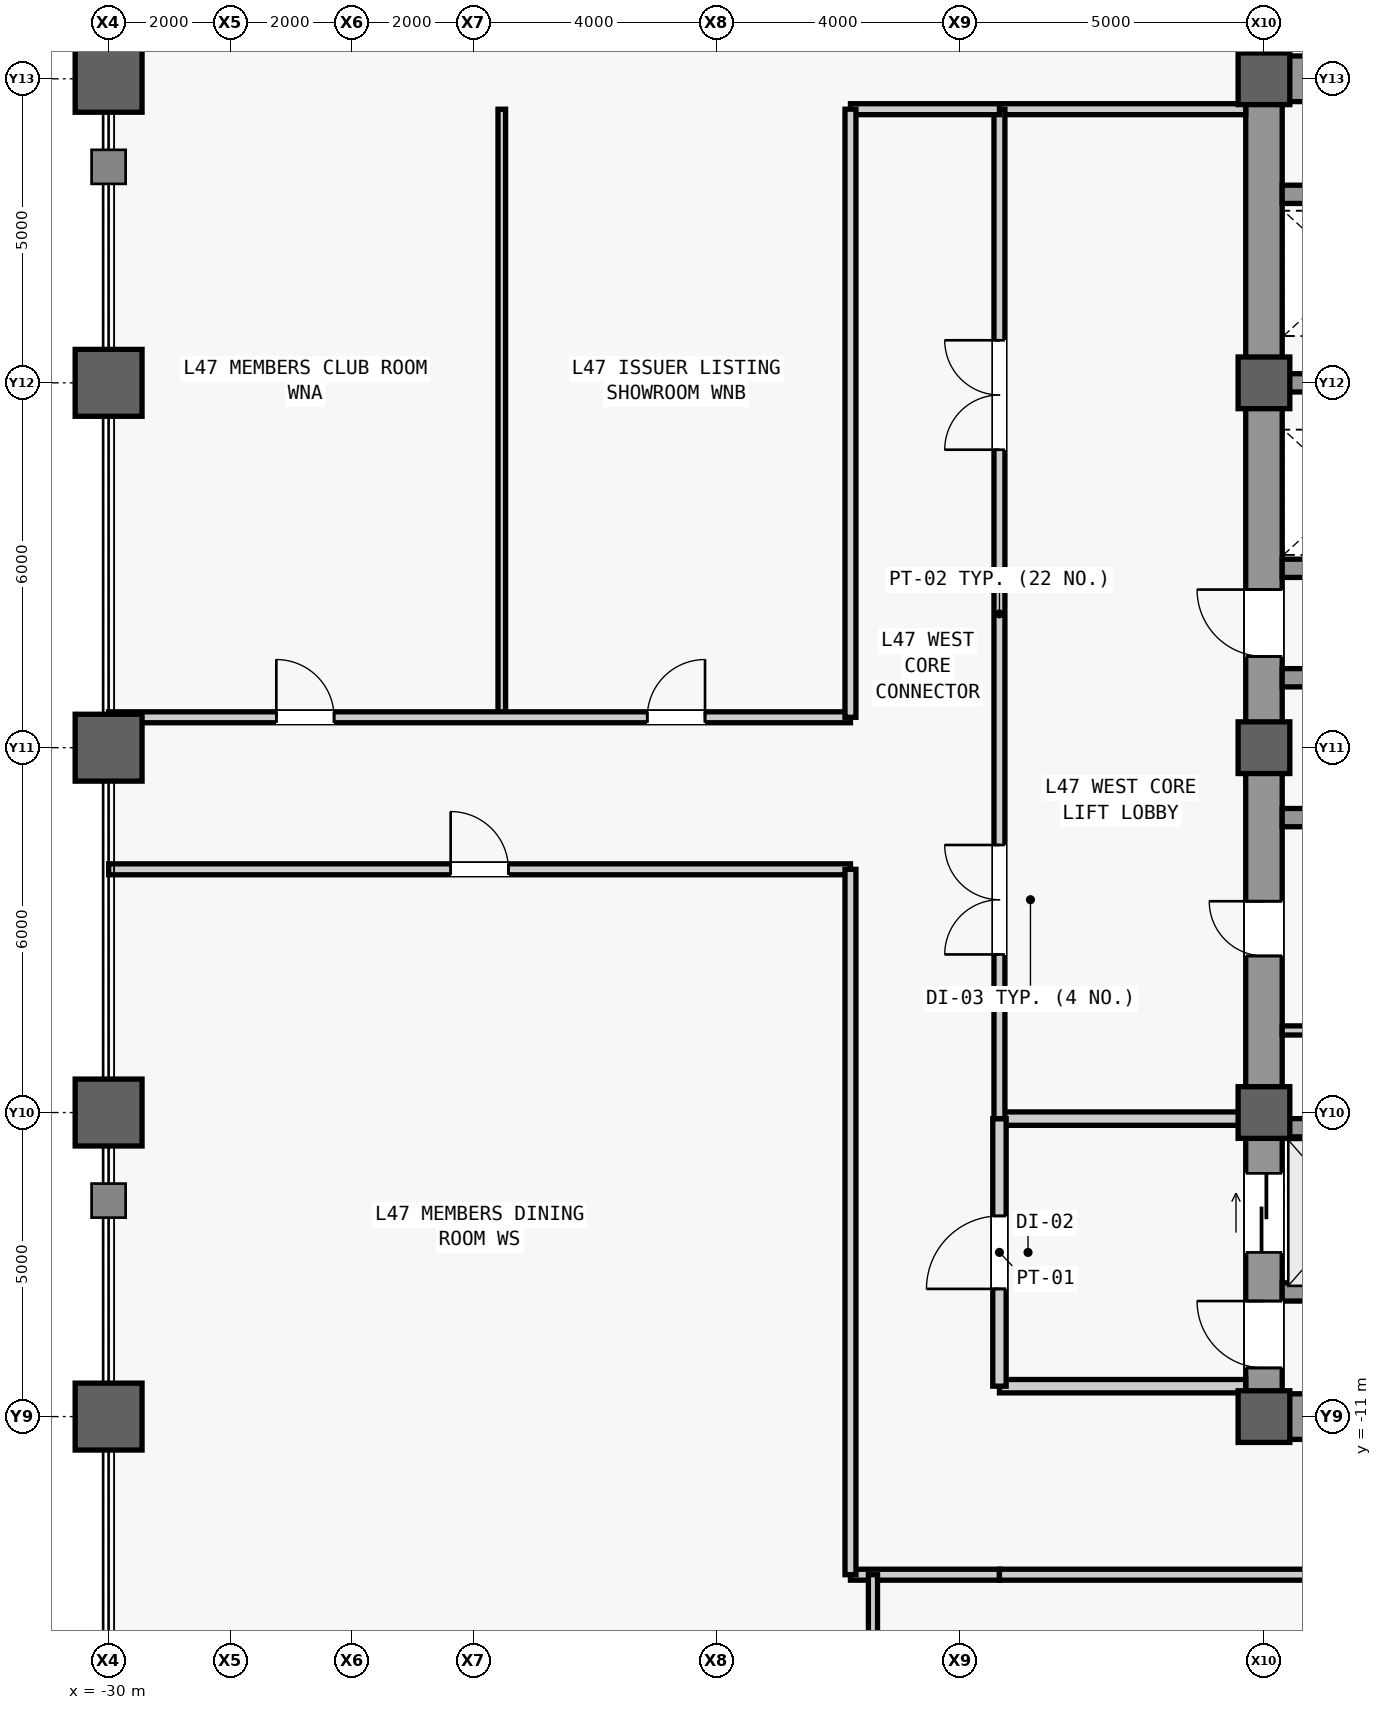
"""IFC4 building model, lengths in metres.
Left out: names, types, materials, properties, quantities, classifications, styles, units other than length and angle.
Written with IfcOpenShell. Run it as: python <this file> out.ifc"""

import sys

from ifc_helpers import new_model, si_unit, direction, frame, frame_2d, origin, origin_2d, place, context, subcontext, project, spatial, rectangle, hollow_rectangle, extrude, source, transform, mapped, element, fill, save


model = new_model("IFC4")
c1 = context("Model", 3, precision=1e-05, world=origin(), true_north=direction((0.0, 1.0)))
c2 = subcontext(c1, "Body", "Model", "MODEL_VIEW")
j1 = project(units=[si_unit("LENGTHUNIT", "METRE"), si_unit("PLANEANGLEUNIT", "RADIAN")], contexts=[c1])
p1 = place(None, origin())
s1 = spatial("IfcSite", under=j1, at=p1, CompositionType="ELEMENT")
p2 = place(p1, origin())
s2 = spatial("IfcBuilding", under=s1, at=p2, CompositionType="ELEMENT")
p3 = place(p2, frame((0.0, 0.0, 203.1)))
s3 = spatial("IfcBuildingStorey", under=s2, at=p3, CompositionType="ELEMENT", Elevation=203.1)
m1 = source(origin(), c2, "Body", "SweptSolid", [
    extrude(rectangle(XDim=22.0, YDim=0.6, at=frame_2d((11.0, 0.0))), origin(), (0.0, 0.0, 1.0), 3.78),
])
p4 = place(p3, frame((-11.0, -11.0, 0.0), z_axis=(0.0, 0.0, 1.0), x_axis=(0.0, 1.0, 0.0)))
e1 = element("IfcWall", 1, at=p4, inside=s3, PredefinedType="SHEAR", context=c2, shape_type="MappedRepresentation", body=[
    mapped(m1, transform((0.0, 0.0, 0.0), scale=1.0)),
])
m2 = source(origin(), c2, "Body", "SweptSolid", [
    extrude(rectangle(XDim=1.1, YDim=2.2, at=frame_2d((0.55, 1.1))), frame((0.0, 0.31, 0.0), z_axis=(0.0, -1.0, 0.0), x_axis=(1.0, 0.0, 0.0)), (0.0, 0.0, 1.0), 0.62),
])
p5 = place(p4, frame((0.8, 0.0, 0.0)))
e2 = element("IfcOpeningElement", 2, at=p5, cuts=e1, PredefinedType="OPENING", context=c2, shape_type="MappedRepresentation", body=[
    mapped(m2, transform((0.0, 0.0, 0.0), scale=1.0)),
])
p6 = place(p4, frame((12.5, 0.0, 0.0)))
e3 = element("IfcOpeningElement", 3, at=p6, cuts=e1, PredefinedType="OPENING", context=c2, shape_type="MappedRepresentation", body=[
    mapped(m2, transform((0.0, 0.0, 0.0), scale=1.0)),
])
m3 = source(origin(), c2, "Body", "SweptSolid", [
    extrude(rectangle(XDim=0.9, YDim=2.15, at=frame_2d((0.45, 1.075))), frame((0.0, 0.31, 0.0), z_axis=(0.0, -1.0, 0.0), x_axis=(1.0, 0.0, 0.0)), (0.0, 0.0, 1.0), 0.62),
])
p7 = place(p4, frame((7.575, 0.0, 0.0)))
e4 = element("IfcOpeningElement", 4, at=p7, cuts=e1, PredefinedType="OPENING", context=c2, shape_type="MappedRepresentation", body=[
    mapped(m3, transform((0.0, 0.0, 0.0), scale=1.0)),
])
m4 = source(origin(), c2, "Body", "SweptSolid", [
    extrude(rectangle(XDim=1.3, YDim=2.3, at=frame_2d((0.65, 1.15))), frame((0.0, 0.31, 0.0), z_axis=(0.0, -1.0, 0.0), x_axis=(1.0, 0.0, 0.0)), (0.0, 0.0, 1.0), 0.62),
])
p8 = place(p4, frame((2.7, 0.0, 0.0)))
e5 = element("IfcOpeningElement", 5, at=p8, cuts=e1, PredefinedType="OPENING", context=c2, shape_type="MappedRepresentation", body=[
    mapped(m4, transform((0.0, 0.0, 0.0), scale=1.0)),
])
m5 = source(origin(), c2, "Body", "SweptSolid", [
    extrude(rectangle(XDim=5.85, YDim=0.75, at=frame_2d((2.925, 0.0))), origin(), (0.0, 0.0, 1.0), 3.78),
])
for number, where, z_axis, x_axis in (
    (6, (-10.7, -11.0, 0.0), (0.0, 0.0, 1.0), (1.0, 0.0, 0.0)),
    (7, (-10.7, 11.0, 0.0), (0.0, 0.0, 1.0), (1.0, 0.0, 0.0)),
):
    element("IfcWall", number, at=place(p3, frame(where, z_axis=z_axis, x_axis=x_axis)), inside=s3, PredefinedType="SHEAR", context=c2, shape_type="MappedRepresentation", body=[
        mapped(m5, transform((0.0, 0.0, 0.0), scale=1.0)),
    ])
m6 = source(origin(), c2, "Body", "SweptSolid", [
    extrude(rectangle(XDim=5.6, YDim=0.3, at=frame_2d((2.8, 0.0))), origin(), (0.0, 0.0, 1.0), 3.78),
])
for number, where, z_axis, x_axis in (
    (8, (-10.7, -1.15, 0.0), (0.0, 0.0, 1.0), (1.0, 0.0, 0.0)),
    (9, (-10.7, 1.15, 0.0), (0.0, 0.0, 1.0), (1.0, 0.0, 0.0)),
):
    element("IfcWall", number, at=place(p3, frame(where, z_axis=z_axis, x_axis=x_axis)), inside=s3, PredefinedType="SHEAR", context=c2, shape_type="MappedRepresentation", body=[
        mapped(m6, transform((0.0, 0.0, 0.0), scale=1.0)),
    ])
m7 = source(origin(), c2, "Body", "SweptSolid", [
    extrude(hollow_rectangle(XDim=1.1, YDim=1.1, WallThickness=0.06, at=origin_2d()), origin(), (0.0, 0.0, 1.0), 4.0),
])
for number, where, z_axis, x_axis in (
    (10, (-30.0, -11.0, 0.0), (0.0, 0.0, 1.0), (1.0, 0.0, 0.0)),
    (11, (-30.0, -6.0, 0.0), (0.0, 0.0, 1.0), (1.0, 0.0, 0.0)),
    (12, (-30.0, 0.0, 0.0), (0.0, 0.0, 1.0), (1.0, 0.0, 0.0)),
    (13, (-30.0, 6.0, 0.0), (0.0, 0.0, 1.0), (1.0, 0.0, 0.0)),
    (14, (-30.0, 11.0, 0.0), (0.0, 0.0, 1.0), (1.0, 0.0, 0.0)),
):
    element("IfcColumn", number, at=place(p3, frame(where, z_axis=z_axis, x_axis=x_axis)), inside=s3, PredefinedType="COLUMN", context=c2, shape_type="MappedRepresentation", body=[
        mapped(m7, transform((0.0, 0.0, 0.0), scale=1.0)),
    ])
m8 = source(origin(), c2, "Body", "SweptSolid", [
    extrude(rectangle(XDim=0.85, YDim=0.85, at=origin_2d()), origin(), (0.0, 0.0, 1.0), 4.0),
])
for number, where, z_axis, x_axis in (
    (15, (-11.0, -11.0, 0.0), (0.0, 0.0, 1.0), (1.0, 0.0, 0.0)),
    (16, (-11.0, -6.0, 0.0), (0.0, 0.0, 1.0), (1.0, 0.0, 0.0)),
    (17, (-11.0, 0.0, 0.0), (0.0, 0.0, 1.0), (1.0, 0.0, 0.0)),
    (18, (-11.0, 6.0, 0.0), (0.0, 0.0, 1.0), (1.0, 0.0, 0.0)),
    (19, (-11.0, 11.0, 0.0), (0.0, 0.0, 1.0), (1.0, 0.0, 0.0)),
):
    element("IfcColumn", number, at=place(p3, frame(where, z_axis=z_axis, x_axis=x_axis)), inside=s3, PredefinedType="COLUMN", context=c2, shape_type="MappedRepresentation", body=[
        mapped(m8, transform((0.0, 0.0, 0.0), scale=1.0)),
    ])
m9 = source(origin(), c2, "Body", "SweptSolid", [
    extrude(rectangle(XDim=2.2, YDim=0.3, at=frame_2d((1.1, 0.0))), origin(), (0.0, 0.0, 1.0), 3.78),
])
for number, where, z_axis, x_axis in (
    (20, (-10.7, -8.95, 0.0), (0.0, 0.0, 1.0), (1.0, 0.0, 0.0)),
    (21, (-10.7, -6.25, 0.0), (0.0, 0.0, 1.0), (1.0, 0.0, 0.0)),
    (22, (-10.7, 2.95, 0.0), (0.0, 0.0, 1.0), (1.0, 0.0, 0.0)),
    (23, (-10.7, 6.0, 0.0), (0.0, 0.0, 1.0), (1.0, 0.0, 0.0)),
    (24, (-10.7, 9.1, 0.0), (0.0, 0.0, 1.0), (1.0, 0.0, 0.0)),
):
    element("IfcWall", number, at=place(p3, frame(where, z_axis=z_axis, x_axis=x_axis)), inside=s3, PredefinedType="SHEAR", context=c2, shape_type="MappedRepresentation", body=[
        mapped(m9, transform((0.0, 0.0, 0.0), scale=1.0)),
    ])
m10 = source(origin(), c2, "Body", "SweptSolid", [
    extrude(rectangle(XDim=2.05, YDim=0.15, at=frame_2d((1.025, 0.0))), origin(), (0.0, 0.0, 1.0), 3.78),
])
p9 = place(p3, frame((-10.7, -4.65, 0.0), z_axis=(0.0, 0.0, 1.0), x_axis=(1.0, 0.0, 0.0)))
e25 = element("IfcWall", 25, at=p9, inside=s3, PredefinedType="PARTITIONING", context=c2, shape_type="MappedRepresentation", body=[
    mapped(m10, transform((0.0, 0.0, 0.0), scale=1.0)),
])
m11 = source(origin(), c2, "Body", "SweptSolid", [
    extrude(rectangle(XDim=4.05, YDim=0.22, at=frame_2d((2.025, 0.0))), origin(), (0.0, 0.0, 1.0), 3.78),
])
p10 = place(p3, frame((-15.35, -10.5, 0.0), z_axis=(0.0, 0.0, 1.0), x_axis=(1.0, 0.0, 0.0)))
e26 = element("IfcWall", 26, at=p10, inside=s3, PredefinedType="PARTITIONING", context=c2, shape_type="MappedRepresentation", body=[
    mapped(m11, transform((0.0, 0.0, 0.0), scale=1.0)),
])
m12 = source(origin(), c2, "Body", "SweptSolid", [
    extrude(rectangle(XDim=4.05, YDim=0.22, at=frame_2d((2.025, 0.0))), origin(), (0.0, 0.0, 1.0), 3.007),
])
p11 = place(p3, frame((-15.35, -6.1, 0.0), z_axis=(0.0, 0.0, 1.0), x_axis=(1.0, 0.0, 0.0)))
e27 = element("IfcWall", 27, at=p11, inside=s3, PredefinedType="PARTITIONING", context=c2, shape_type="MappedRepresentation", body=[
    mapped(m12, transform((0.0, 0.0, 0.0), scale=1.0)),
])
m13 = source(origin(), c2, "Body", "SweptSolid", [
    extrude(rectangle(XDim=4.4, YDim=0.22, at=frame_2d((2.2, 0.0))), origin(), (0.0, 0.0, 1.0), 3.78),
])
p12 = place(p3, frame((-15.35, -10.5, 0.0), z_axis=(0.0, 0.0, 1.0), x_axis=(0.0, 1.0, 0.0)))
e28 = element("IfcWall", 28, at=p12, inside=s3, PredefinedType="PARTITIONING", context=c2, shape_type="MappedRepresentation", body=[
    mapped(m13, transform((0.0, 0.0, 0.0), scale=1.0)),
])
m14 = source(origin(), c2, "Body", "SweptSolid", [
    extrude(rectangle(XDim=1.2, YDim=2.2, at=frame_2d((0.6, 1.1))), frame((0.0, 0.12, 0.0), z_axis=(0.0, -1.0, 0.0), x_axis=(1.0, 0.0, 0.0)), (0.0, 0.0, 1.0), 0.24),
])
p13 = place(p12, frame((1.6, 0.0, 0.0)))
e29 = element("IfcOpeningElement", 29, at=p13, cuts=e28, PredefinedType="OPENING", context=c2, shape_type="MappedRepresentation", body=[
    mapped(m14, transform((0.0, 0.0, 0.0), scale=1.0)),
])
m15 = source(origin(), c2, "Body", "SweptSolid", [
    extrude(rectangle(XDim=4.05, YDim=0.18, at=frame_2d((2.025, 0.0))), origin(), (0.0, 0.0, 1.0), 3.78),
])
p14 = place(p3, frame((-15.35, 10.5, 0.0), z_axis=(0.0, 0.0, 1.0), x_axis=(1.0, 0.0, 0.0)))
e30 = element("IfcWall", 30, at=p14, inside=s3, PredefinedType="PARTITIONING", context=c2, shape_type="MappedRepresentation", body=[
    mapped(m15, transform((0.0, 0.0, 0.0), scale=1.0)),
])
m16 = source(origin(), c2, "Body", "SweptSolid", [
    extrude(rectangle(XDim=16.6, YDim=0.18, at=frame_2d((8.3, 0.0))), origin(), (0.0, 0.0, 1.0), 3.78),
])
p15 = place(p3, frame((-15.35, -6.1, 0.0), z_axis=(0.0, 0.0, 1.0), x_axis=(0.0, 1.0, 0.0)))
e31 = element("IfcWall", 31, at=p15, inside=s3, PredefinedType="PARTITIONING", context=c2, shape_type="MappedRepresentation", body=[
    mapped(m16, transform((0.0, 0.0, 0.0), scale=1.0)),
])
m17 = source(origin(), c2, "Body", "SweptSolid", [
    extrude(rectangle(XDim=1.8, YDim=2.25, at=frame_2d((0.9, 1.125))), frame((0.0, 0.1, 0.0), z_axis=(0.0, -1.0, 0.0), x_axis=(1.0, 0.0, 0.0)), (0.0, 0.0, 1.0), 0.2),
])
p16 = place(p15, frame((2.7, 0.0, 0.0)))
e32 = element("IfcOpeningElement", 32, at=p16, cuts=e31, PredefinedType="OPENING", context=c2, shape_type="MappedRepresentation", body=[
    mapped(m17, transform((0.0, 0.0, 0.0), scale=1.0)),
])
p17 = place(p15, frame((11.0, 0.0, 0.0)))
e33 = element("IfcOpeningElement", 33, at=p17, cuts=e31, PredefinedType="OPENING", context=c2, shape_type="MappedRepresentation", body=[
    mapped(m17, transform((0.0, 0.0, 0.0), scale=1.0)),
])
m18 = source(origin(), c2, "Body", "SweptSolid", [
    extrude(rectangle(XDim=2.45, YDim=0.18, at=frame_2d((1.225, 0.0))), origin(), (0.0, 0.0, 1.0), 3.78),
])
for number, where, z_axis, x_axis in (
    (34, (-17.8, 10.5, 0.0), (0.0, 0.0, 1.0), (1.0, 0.0, 0.0)),
    (35, (-17.8, -13.6, 0.0), (0.0, 0.0, 1.0), (1.0, 0.0, 0.0)),
):
    element("IfcWall", number, at=place(p3, frame(where, z_axis=z_axis, x_axis=x_axis)), inside=s3, PredefinedType="PARTITIONING", context=c2, shape_type="MappedRepresentation", body=[
        mapped(m18, transform((0.0, 0.0, 0.0), scale=1.0)),
    ])
m19 = source(origin(), c2, "Body", "SweptSolid", [
    extrude(rectangle(XDim=16.4, YDim=0.15, at=frame_2d((8.2, 0.0))), origin(), (0.0, 0.0, 1.0), 3.78),
])
p18 = place(p3, frame((-17.43, -30.0, 0.0), z_axis=(0.0, 0.0, 1.0), x_axis=(0.0, 1.0, 0.0)))
e36 = element("IfcWall", 36, at=p18, inside=s3, PredefinedType="PARTITIONING", context=c2, shape_type="MappedRepresentation", body=[
    mapped(m19, transform((0.0, 0.0, 0.0), scale=1.0)),
])
m20 = source(origin(), c2, "Body", "SweptSolid", [
    extrude(rectangle(XDim=0.95, YDim=2.15, at=frame_2d((0.475, 1.075))), frame((0.0, 0.085, 0.0), z_axis=(0.0, -1.0, 0.0), x_axis=(1.0, 0.0, 0.0)), (0.0, 0.0, 1.0), 0.17),
])
p19 = place(p18, frame((11.825, 0.0, 0.0)))
e37 = element("IfcOpeningElement", 37, at=p19, cuts=e36, PredefinedType="OPENING", context=c2, shape_type="MappedRepresentation", body=[
    mapped(m20, transform((0.0, 0.0, 0.0), scale=1.0)),
])
m21 = source(origin(), c2, "Body", "SweptSolid", [
    extrude(rectangle(XDim=16.75, YDim=0.18, at=frame_2d((8.375, 0.0))), origin(), (0.0, 0.0, 1.0), 3.78),
])
p20 = place(p3, frame((-15.35, -13.6, 0.0), z_axis=(0.0, 0.0, 1.0), x_axis=(1.0, 0.0, 0.0)))
e38 = element("IfcWall", 38, at=p20, inside=s3, PredefinedType="PARTITIONING", context=c2, shape_type="MappedRepresentation", body=[
    mapped(m21, transform((0.0, 0.0, 0.0), scale=1.0)),
])
m22 = source(origin(), c2, "Body", "SweptSolid", [
    extrude(rectangle(XDim=12.2, YDim=0.18, at=frame_2d((6.1, 0.0))), origin(), (0.0, 0.0, 1.0), 3.78),
])
p21 = place(p3, frame((-30.0, -2.0, 0.0), z_axis=(0.0, 0.0, 1.0), x_axis=(1.0, 0.0, 0.0)))
e39 = element("IfcWall", 39, at=p21, inside=s3, PredefinedType="PARTITIONING", context=c2, shape_type="MappedRepresentation", body=[
    mapped(m22, transform((0.0, 0.0, 0.0), scale=1.0)),
])
m23 = source(origin(), c2, "Body", "SweptSolid", [
    extrude(rectangle(XDim=0.95, YDim=2.15, at=frame_2d((0.475, 1.075))), frame((0.0, 0.1, 0.0), z_axis=(0.0, -1.0, 0.0), x_axis=(1.0, 0.0, 0.0)), (0.0, 0.0, 1.0), 0.2),
])
p22 = place(p21, frame((5.625, 0.0, 0.0)))
e40 = element("IfcOpeningElement", 40, at=p22, cuts=e39, PredefinedType="OPENING", context=c2, shape_type="MappedRepresentation", body=[
    mapped(m23, transform((0.0, 0.0, 0.0), scale=1.0)),
])
m24 = source(origin(), c2, "Body", "SweptSolid", [
    extrude(rectangle(XDim=11.6, YDim=0.18, at=frame_2d((5.8, 0.0))), origin(), (0.0, 0.0, 1.0), 3.78),
])
p23 = place(p3, frame((-17.8, -13.6, 0.0), z_axis=(0.0, 0.0, 1.0), x_axis=(0.0, 1.0, 0.0)))
e41 = element("IfcWall", 41, at=p23, inside=s3, PredefinedType="PARTITIONING", context=c2, shape_type="MappedRepresentation", body=[
    mapped(m24, transform((0.0, 0.0, 0.0), scale=1.0)),
])
m25 = source(origin(), c2, "Body", "SweptSolid", [
    extrude(rectangle(XDim=10.0, YDim=0.125, at=frame_2d((5.0, 0.0))), origin(), (0.0, 0.0, 1.0), 3.78),
])
p24 = place(p3, frame((-23.534, 0.5, 0.0), z_axis=(0.0, 0.0, 1.0), x_axis=(0.0, 1.0, 0.0)))
e42 = element("IfcWall", 42, at=p24, inside=s3, PredefinedType="PARTITIONING", context=c2, shape_type="MappedRepresentation", body=[
    mapped(m25, transform((0.0, 0.0, 0.0), scale=1.0)),
])
p25 = place(p3, frame((-30.0, 0.5, 0.0), z_axis=(0.0, 0.0, 1.0), x_axis=(1.0, 0.0, 0.0)))
e43 = element("IfcWall", 43, at=p25, inside=s3, PredefinedType="PARTITIONING", context=c2, shape_type="MappedRepresentation", body=[
    mapped(m22, transform((0.0, 0.0, 0.0), scale=1.0)),
])
p26 = place(p25, frame((2.758, 0.0, 0.0)))
e44 = element("IfcOpeningElement", 44, at=p26, cuts=e43, PredefinedType="OPENING", context=c2, shape_type="MappedRepresentation", body=[
    mapped(m23, transform((0.0, 0.0, 0.0), scale=1.0)),
])
p27 = place(p25, frame((8.858, 0.0, 0.0)))
e45 = element("IfcOpeningElement", 45, at=p27, cuts=e43, PredefinedType="OPENING", context=c2, shape_type="MappedRepresentation", body=[
    mapped(m23, transform((0.0, 0.0, 0.0), scale=1.0)),
])
m26 = source(origin(), c2, "Body", "SweptSolid", [
    extrude(rectangle(XDim=10.0, YDim=0.18, at=frame_2d((5.0, 0.0))), origin(), (0.0, 0.0, 1.0), 3.78),
])
p28 = place(p3, frame((-17.8, 0.5, 0.0), z_axis=(0.0, 0.0, 1.0), x_axis=(0.0, 1.0, 0.0)))
e46 = element("IfcWall", 46, at=p28, inside=s3, PredefinedType="PARTITIONING", context=c2, shape_type="MappedRepresentation", body=[
    mapped(m26, transform((0.0, 0.0, 0.0), scale=1.0)),
])
m27 = source(origin(), c2, "Body", "SweptSolid", [
    extrude(rectangle(XDim=1.1, YDim=2.2, at=frame_2d((0.55, 1.1))), frame((0.0, 0.025, 0.0), z_axis=(0.0, -1.0, 0.0), x_axis=(1.0, 0.0, 0.0)), (0.0, 0.0, 1.0), 0.05),
])
p29 = place(p5, origin())
e47 = element("IfcDoor", 47, at=p29, inside=s3, OperationType="SINGLE_SWING_RIGHT", PredefinedType="DOOR", context=c2, shape_type="MappedRepresentation", body=[
    mapped(m27, transform((0.0, 0.0, 0.0), scale=1.0)),
])
fill(e2, e47)
p30 = place(p6, origin())
e48 = element("IfcDoor", 48, at=p30, inside=s3, OperationType="SINGLE_SWING_RIGHT", PredefinedType="DOOR", context=c2, shape_type="MappedRepresentation", body=[
    mapped(m27, transform((0.0, 0.0, 0.0), scale=1.0)),
])
fill(e3, e48)
m28 = source(origin(), c2, "Body", "SweptSolid", [
    extrude(rectangle(XDim=0.9, YDim=2.15, at=frame_2d((0.45, 1.075))), frame((0.0, 0.025, 0.0), z_axis=(0.0, -1.0, 0.0), x_axis=(1.0, 0.0, 0.0)), (0.0, 0.0, 1.0), 0.05),
])
p31 = place(p7, origin())
e49 = element("IfcDoor", 49, at=p31, inside=s3, OperationType="SINGLE_SWING_RIGHT", PredefinedType="DOOR", context=c2, shape_type="MappedRepresentation", body=[
    mapped(m28, transform((0.0, 0.0, 0.0), scale=1.0)),
])
fill(e4, e49)
m29 = source(origin(), c2, "Body", "SweptSolid", [
    extrude(rectangle(XDim=1.2, YDim=2.2, at=frame_2d((0.6, 1.1))), frame((0.0, 0.025, 0.0), z_axis=(0.0, -1.0, 0.0), x_axis=(1.0, 0.0, 0.0)), (0.0, 0.0, 1.0), 0.05),
])
p32 = place(p13, origin())
e50 = element("IfcDoor", 50, at=p32, inside=s3, OperationType="SINGLE_SWING_LEFT", PredefinedType="DOOR", context=c2, shape_type="MappedRepresentation", body=[
    mapped(m29, transform((0.0, 0.0, 0.0), scale=1.0)),
])
fill(e29, e50)
m30 = source(origin(), c2, "Body", "SweptSolid", [
    extrude(rectangle(XDim=1.8, YDim=2.25, at=frame_2d((0.9, 1.125))), frame((0.0, 0.025, 0.0), z_axis=(0.0, -1.0, 0.0), x_axis=(1.0, 0.0, 0.0)), (0.0, 0.0, 1.0), 0.05),
])
p33 = place(p16, origin())
e51 = element("IfcDoor", 51, at=p33, inside=s3, OperationType="SINGLE_SWING_LEFT", PredefinedType="DOOR", context=c2, shape_type="MappedRepresentation", body=[
    mapped(m30, transform((0.0, 0.0, 0.0), scale=1.0)),
])
fill(e32, e51)
p34 = place(p17, origin())
e52 = element("IfcDoor", 52, at=p34, inside=s3, OperationType="SINGLE_SWING_RIGHT", PredefinedType="DOOR", context=c2, shape_type="MappedRepresentation", body=[
    mapped(m30, transform((0.0, 0.0, 0.0), scale=1.0)),
])
fill(e33, e52)
m31 = source(origin(), c2, "Body", "SweptSolid", [
    extrude(rectangle(XDim=0.95, YDim=2.15, at=frame_2d((0.475, 1.075))), frame((0.0, 0.025, 0.0), z_axis=(0.0, -1.0, 0.0), x_axis=(1.0, 0.0, 0.0)), (0.0, 0.0, 1.0), 0.05),
])
p35 = place(p22, origin())
e53 = element("IfcDoor", 53, at=p35, inside=s3, OperationType="SINGLE_SWING_LEFT", PredefinedType="DOOR", context=c2, shape_type="MappedRepresentation", body=[
    mapped(m31, transform((0.0, 0.0, 0.0), scale=1.0)),
])
fill(e40, e53)
p36 = place(p26, origin())
e54 = element("IfcDoor", 54, at=p36, inside=s3, OperationType="SINGLE_SWING_LEFT", PredefinedType="DOOR", context=c2, shape_type="MappedRepresentation", body=[
    mapped(m31, transform((0.0, 0.0, 0.0), scale=1.0)),
])
fill(e44, e54)
p37 = place(p27, origin())
e55 = element("IfcDoor", 55, at=p37, inside=s3, OperationType="SINGLE_SWING_RIGHT", PredefinedType="DOOR", context=c2, shape_type="MappedRepresentation", body=[
    mapped(m31, transform((0.0, 0.0, 0.0), scale=1.0)),
])
fill(e45, e55)
m32 = source(origin(), c2, "Body", "SweptSolid", [
    extrude(rectangle(XDim=1.3, YDim=2.3, at=frame_2d((0.65, 1.15))), frame((0.0, 0.025, 0.0), z_axis=(0.0, -1.0, 0.0), x_axis=(1.0, 0.0, 0.0)), (0.0, 0.0, 1.0), 0.05),
])
p38 = place(p8, origin())
e56 = element("IfcDoor", 56, at=p38, inside=s3, OperationType="SLIDING_TO_LEFT", PredefinedType="DOOR", context=c2, shape_type="MappedRepresentation", body=[
    mapped(m32, transform((0.0, 0.0, 0.0), scale=1.0)),
])
fill(e5, e56)
save(model, sys.argv[1])
